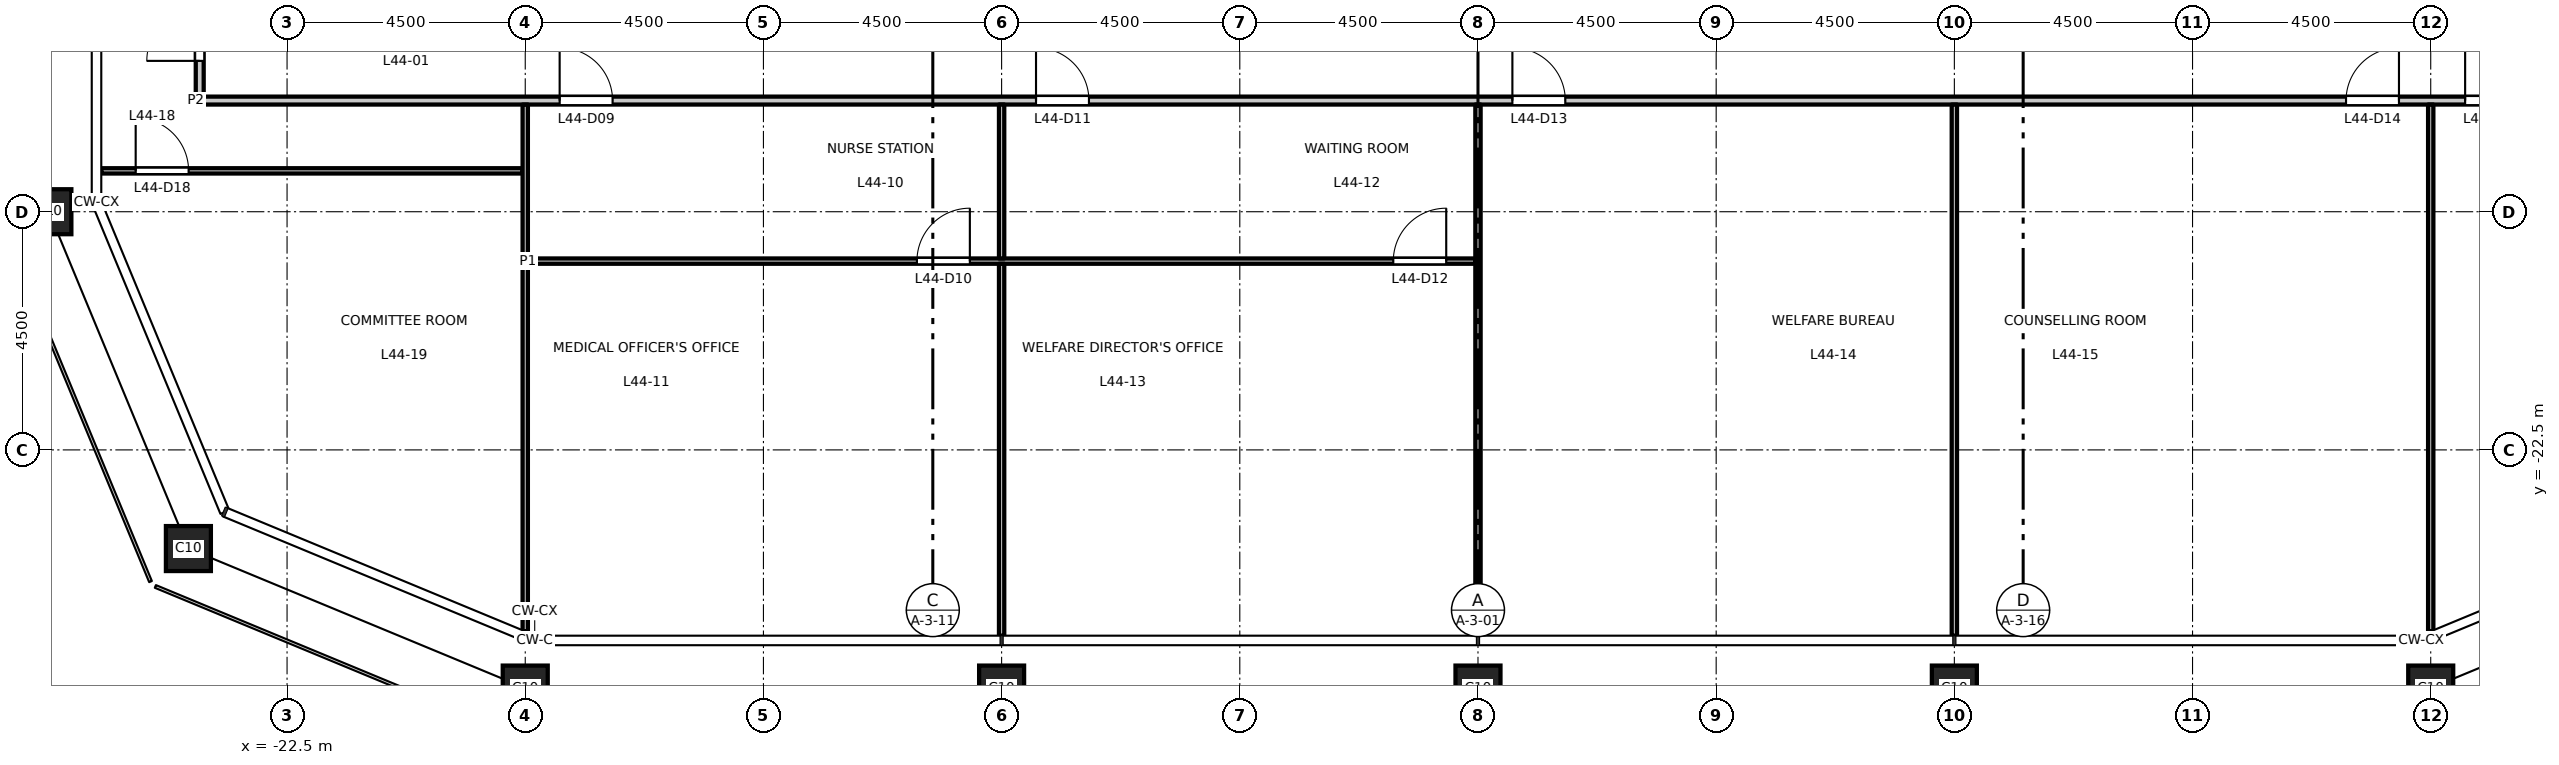
"""IFC4 building model, lengths in metres.
Left out: names, types, materials, properties, quantities, classifications, styles, units other than length and angle.
Written with IfcOpenShell. Run it as: python <this file> out.ifc"""

import sys

from ifc_helpers import new_model, si_unit, direction, frame, frame_2d, origin, origin_2d, place, context, subcontext, project, spatial, rectangle, hollow_rectangle, extrude, element, fill, save


model = new_model("IFC4")
c1 = context("Model", 3, precision=1e-05, world=origin(), true_north=direction((0.0, 1.0)))
c2 = subcontext(c1, "Body", "Model", "MODEL_VIEW")
j1 = project(units=[si_unit("LENGTHUNIT", "METRE"), si_unit("PLANEANGLEUNIT", "RADIAN")], contexts=[c1])
p1 = place(None, origin())
s1 = spatial("IfcSite", under=j1, at=p1, CompositionType="ELEMENT")
p2 = place(p1, origin())
s2 = spatial("IfcBuilding", under=s1, at=p2, CompositionType="ELEMENT")
p3 = place(p2, frame((0.0, 0.0, 206.2)))
s3 = spatial("IfcBuildingStorey", under=s2, at=p3, CompositionType="ELEMENT", Elevation=206.2)
for number, where, z_axis, x_axis in (
    (1, (-18.0, -27.0, 0.0), (0.0, 0.0, 1.0), (1.0, 0.0, 0.0)),
    (2, (-9.0, -27.0, 0.0), (0.0, 0.0, 1.0), (1.0, 0.0, 0.0)),
    (3, (0.0, -27.0, 0.0), (0.0, 0.0, 1.0), (1.0, 0.0, 0.0)),
    (4, (9.0, -27.0, 0.0), (0.0, 0.0, 1.0), (1.0, 0.0, 0.0)),
    (5, (18.0, -27.0, 0.0), (0.0, 0.0, 1.0), (1.0, 0.0, 0.0)),
    (6, (-27.0, -18.0, 0.0), (0.0, 0.0, 1.0), (1.0, 0.0, 0.0)),
    (7, (-24.364, -24.364, 0.0), (0.0, 0.0, 1.0), (1.0, 0.0, 0.0)),
):
    element("IfcColumn", number, at=place(p3, frame(where, z_axis=z_axis, x_axis=x_axis)), inside=s3, PredefinedType="COLUMN", context=c2, shape_type="SweptSolid", body=[
        extrude(hollow_rectangle(XDim=0.85, YDim=0.85, WallThickness=0.05, at=origin_2d()), origin(), (0.0, 0.0, 1.0), 4.5),
    ])
p4 = place(p3, frame((-17.95, -18.933, 0.0), z_axis=(0.0, 0.0, 1.0), x_axis=(1.0, 0.0, 0.0)))
e8 = element("IfcWall", 8, at=p4, inside=s3, PredefinedType="PARTITIONING", context=c2, shape_type="SweptSolid", body=[
    extrude(rectangle(XDim=17.9, YDim=0.1, at=frame_2d((8.95, 0.0))), origin(), (0.0, 0.0, 1.0), 4.35),
])
p5 = place(p4, frame((7.35, 0.0, 0.0)))
e9 = element("IfcOpeningElement", 9, at=p5, cuts=e8, PredefinedType="OPENING", context=c2, shape_type="SweptSolid", body=[
    extrude(rectangle(XDim=1.0, YDim=2.1, at=frame_2d((0.5, 1.05))), frame((0.0, 0.06, 0.0), z_axis=(0.0, -1.0, 0.0), x_axis=(1.0, 0.0, 0.0)), (0.0, 0.0, 1.0), 0.12),
])
p6 = place(p4, frame((16.35, 0.0, 0.0)))
e10 = element("IfcOpeningElement", 10, at=p6, cuts=e8, PredefinedType="OPENING", context=c2, shape_type="SweptSolid", body=[
    extrude(rectangle(XDim=1.0, YDim=2.1, at=frame_2d((0.5, 1.05))), frame((0.0, 0.06, 0.0), z_axis=(0.0, -1.0, 0.0), x_axis=(1.0, 0.0, 0.0)), (0.0, 0.0, 1.0), 0.12),
])
p7 = place(p3, frame((-26.01, -17.228, 0.0), z_axis=(0.0, 0.0, 1.0), x_axis=(1.0, 0.0, 0.0)))
e11 = element("IfcWall", 11, at=p7, inside=s3, PredefinedType="PARTITIONING", context=c2, shape_type="SweptSolid", body=[
    extrude(rectangle(XDim=7.96, YDim=0.1, at=frame_2d((3.98, 0.0))), origin(), (0.0, 0.0, 1.0), 4.35),
])
p8 = place(p7, frame((0.65, 0.0, 0.0)))
e12 = element("IfcOpeningElement", 12, at=p8, cuts=e11, PredefinedType="OPENING", context=c2, shape_type="SweptSolid", body=[
    extrude(rectangle(XDim=1.0, YDim=2.1, at=frame_2d((0.5, 1.05))), frame((0.0, 0.06, 0.0), z_axis=(0.0, -1.0, 0.0), x_axis=(1.0, 0.0, 0.0)), (0.0, 0.0, 1.0), 0.12),
])
p9 = place(p3, frame((-24.225, -15.9, 0.0), z_axis=(0.0, 0.0, 1.0), x_axis=(1.0, 0.0, 0.0)))
e13 = element("IfcWall", 13, at=p9, inside=s3, PredefinedType="PARTITIONING", context=c2, shape_type="SweptSolid", body=[
    extrude(rectangle(XDim=48.45, YDim=0.15, at=frame_2d((24.225, 0.0))), origin(), (0.0, 0.0, 1.0), 4.35),
])
p10 = place(p9, frame((6.875, 0.0, 0.0)))
e14 = element("IfcOpeningElement", 14, at=p10, cuts=e13, PredefinedType="OPENING", context=c2, shape_type="SweptSolid", body=[
    extrude(rectangle(XDim=1.0, YDim=2.1, at=frame_2d((0.5, 1.05))), frame((0.0, 0.085, 0.0), z_axis=(0.0, -1.0, 0.0), x_axis=(1.0, 0.0, 0.0)), (0.0, 0.0, 1.0), 0.17),
])
p11 = place(p9, frame((15.875, 0.0, 0.0)))
e15 = element("IfcOpeningElement", 15, at=p11, cuts=e13, PredefinedType="OPENING", context=c2, shape_type="SweptSolid", body=[
    extrude(rectangle(XDim=1.0, YDim=2.1, at=frame_2d((0.5, 1.05))), frame((0.0, 0.085, 0.0), z_axis=(0.0, -1.0, 0.0), x_axis=(1.0, 0.0, 0.0)), (0.0, 0.0, 1.0), 0.17),
])
p12 = place(p9, frame((24.875, 0.0, 0.0)))
e16 = element("IfcOpeningElement", 16, at=p12, cuts=e13, PredefinedType="OPENING", context=c2, shape_type="SweptSolid", body=[
    extrude(rectangle(XDim=1.0, YDim=2.1, at=frame_2d((0.5, 1.05))), frame((0.0, 0.085, 0.0), z_axis=(0.0, -1.0, 0.0), x_axis=(1.0, 0.0, 0.0)), (0.0, 0.0, 1.0), 0.17),
])
p13 = place(p9, frame((40.625, 0.0, 0.0)))
e17 = element("IfcOpeningElement", 17, at=p13, cuts=e13, PredefinedType="OPENING", context=c2, shape_type="SweptSolid", body=[
    extrude(rectangle(XDim=1.0, YDim=2.1, at=frame_2d((0.5, 1.05))), frame((0.0, 0.085, 0.0), z_axis=(0.0, -1.0, 0.0), x_axis=(1.0, 0.0, 0.0)), (0.0, 0.0, 1.0), 0.17),
])
p14 = place(p9, frame((42.875, 0.0, 0.0)))
e18 = element("IfcOpeningElement", 18, at=p14, cuts=e13, PredefinedType="OPENING", context=c2, shape_type="SweptSolid", body=[
    extrude(rectangle(XDim=1.0, YDim=2.1, at=frame_2d((0.5, 1.05))), frame((0.0, 0.085, 0.0), z_axis=(0.0, -1.0, 0.0), x_axis=(1.0, 0.0, 0.0)), (0.0, 0.0, 1.0), 0.17),
])
p15 = place(p3, frame((-24.15, -15.825, 0.0), z_axis=(0.0, 0.0, 1.0), x_axis=(0.0, 1.0, 0.0)))
e19 = element("IfcWall", 19, at=p15, inside=s3, PredefinedType="PARTITIONING", context=c2, shape_type="SweptSolid", body=[
    extrude(rectangle(XDim=31.65, YDim=0.15, at=frame_2d((15.825, 0.0))), origin(), (0.0, 0.0, 1.0), 4.35),
])
p16 = place(p15, frame((0.675, 0.0, 0.0)))
e20 = element("IfcOpeningElement", 20, at=p16, cuts=e19, PredefinedType="OPENING", context=c2, shape_type="SweptSolid", body=[
    extrude(rectangle(XDim=1.0, YDim=2.1, at=frame_2d((0.5, 1.05))), frame((0.0, 0.085, 0.0), z_axis=(0.0, -1.0, 0.0), x_axis=(1.0, 0.0, 0.0)), (0.0, 0.0, 1.0), 0.17),
])
p17 = place(p15, frame((2.925, 0.0, 0.0)))
e21 = element("IfcOpeningElement", 21, at=p17, cuts=e19, PredefinedType="OPENING", context=c2, shape_type="SweptSolid", body=[
    extrude(rectangle(XDim=1.0, YDim=2.1, at=frame_2d((0.5, 1.05))), frame((0.0, 0.085, 0.0), z_axis=(0.0, -1.0, 0.0), x_axis=(1.0, 0.0, 0.0)), (0.0, 0.0, 1.0), 0.17),
])
p18 = place(p15, frame((14.175, 0.0, 0.0)))
e22 = element("IfcOpeningElement", 22, at=p18, cuts=e19, PredefinedType="OPENING", context=c2, shape_type="SweptSolid", body=[
    extrude(rectangle(XDim=1.0, YDim=2.1, at=frame_2d((0.5, 1.05))), frame((0.0, 0.085, 0.0), z_axis=(0.0, -1.0, 0.0), x_axis=(1.0, 0.0, 0.0)), (0.0, 0.0, 1.0), 0.17),
])
p19 = place(p15, frame((16.425, 0.0, 0.0)))
e23 = element("IfcOpeningElement", 23, at=p19, cuts=e19, PredefinedType="OPENING", context=c2, shape_type="SweptSolid", body=[
    extrude(rectangle(XDim=1.0, YDim=2.1, at=frame_2d((0.5, 1.05))), frame((0.0, 0.085, 0.0), z_axis=(0.0, -1.0, 0.0), x_axis=(1.0, 0.0, 0.0)), (0.0, 0.0, 1.0), 0.17),
])
p20 = place(p15, frame((27.675, 0.0, 0.0)))
e24 = element("IfcOpeningElement", 24, at=p20, cuts=e19, PredefinedType="OPENING", context=c2, shape_type="SweptSolid", body=[
    extrude(rectangle(XDim=1.0, YDim=2.1, at=frame_2d((0.5, 1.05))), frame((0.0, 0.085, 0.0), z_axis=(0.0, -1.0, 0.0), x_axis=(1.0, 0.0, 0.0)), (0.0, 0.0, 1.0), 0.17),
])
p21 = place(p3, frame((-18.0, -25.928, 0.0), z_axis=(0.0, 0.0, 1.0), x_axis=(0.0, 1.0, 0.0)))
e25 = element("IfcWall", 25, at=p21, inside=s3, PredefinedType="PARTITIONING", context=c2, shape_type="SweptSolid", body=[
    extrude(rectangle(XDim=9.953, YDim=0.1, at=frame_2d((4.977, 0.0))), origin(), (0.0, 0.0, 1.0), 3.65),
])
p22 = place(p3, frame((-9.0, -26.01, 0.0), z_axis=(0.0, 0.0, 1.0), x_axis=(0.0, 1.0, 0.0)))
e26 = element("IfcWall", 26, at=p22, inside=s3, PredefinedType="PARTITIONING", context=c2, shape_type="SweptSolid", body=[
    extrude(rectangle(XDim=7.027, YDim=0.1, at=frame_2d((3.514, 0.0))), origin(), (0.0, 0.0, 1.0), 3.65),
])
p23 = place(p3, frame((-9.0, -18.883, 0.0), z_axis=(0.0, 0.0, 1.0), x_axis=(0.0, 1.0, 0.0)))
e27 = element("IfcWall", 27, at=p23, inside=s3, PredefinedType="PARTITIONING", context=c2, shape_type="SweptSolid", body=[
    extrude(rectangle(XDim=2.908, YDim=0.1, at=frame_2d((1.454, 0.0))), origin(), (0.0, 0.0, 1.0), 3.65),
])
p24 = place(p3, frame((0.0, -26.01, 0.0), z_axis=(0.0, 0.0, 1.0), x_axis=(0.0, 1.0, 0.0)))
e28 = element("IfcWall", 28, at=p24, inside=s3, PredefinedType="PARTITIONING", context=c2, shape_type="SweptSolid", body=[
    extrude(rectangle(XDim=10.035, YDim=0.1, at=frame_2d((5.018, 0.0))), origin(), (0.0, 0.0, 1.0), 3.55),
])
p25 = place(p3, frame((9.0, -26.01, 0.0), z_axis=(0.0, 0.0, 1.0), x_axis=(0.0, 1.0, 0.0)))
e29 = element("IfcWall", 29, at=p25, inside=s3, PredefinedType="PARTITIONING", context=c2, shape_type="SweptSolid", body=[
    extrude(rectangle(XDim=10.035, YDim=0.1, at=frame_2d((5.018, 0.0))), origin(), (0.0, 0.0, 1.0), 3.65),
])
p26 = place(p3, frame((18.0, -25.928, 0.0), z_axis=(0.0, 0.0, 1.0), x_axis=(0.0, 1.0, 0.0)))
e30 = element("IfcWall", 30, at=p26, inside=s3, PredefinedType="PARTITIONING", context=c2, shape_type="SweptSolid", body=[
    extrude(rectangle(XDim=9.953, YDim=0.1, at=frame_2d((4.977, 0.0))), origin(), (0.0, 0.0, 1.0), 3.65),
])
p27 = place(p10, origin())
e31 = element("IfcDoor", 31, at=p27, inside=s3, OperationType="SINGLE_SWING_LEFT", PredefinedType="DOOR", context=c2, shape_type="SweptSolid", body=[
    extrude(rectangle(XDim=1.0, YDim=2.1, at=frame_2d((0.5, 1.05))), frame((0.0, 0.025, 0.0), z_axis=(0.0, -1.0, 0.0), x_axis=(1.0, 0.0, 0.0)), (0.0, 0.0, 1.0), 0.05),
])
fill(e14, e31)
p28 = place(p5, origin())
e32 = element("IfcDoor", 32, at=p28, inside=s3, OperationType="SINGLE_SWING_RIGHT", PredefinedType="DOOR", context=c2, shape_type="SweptSolid", body=[
    extrude(rectangle(XDim=1.0, YDim=2.1, at=frame_2d((0.5, 1.05))), frame((0.0, 0.025, 0.0), z_axis=(0.0, -1.0, 0.0), x_axis=(1.0, 0.0, 0.0)), (0.0, 0.0, 1.0), 0.05),
])
fill(e9, e32)
p29 = place(p11, origin())
e33 = element("IfcDoor", 33, at=p29, inside=s3, OperationType="SINGLE_SWING_LEFT", PredefinedType="DOOR", context=c2, shape_type="SweptSolid", body=[
    extrude(rectangle(XDim=1.0, YDim=2.1, at=frame_2d((0.5, 1.05))), frame((0.0, 0.025, 0.0), z_axis=(0.0, -1.0, 0.0), x_axis=(1.0, 0.0, 0.0)), (0.0, 0.0, 1.0), 0.05),
])
fill(e15, e33)
p30 = place(p6, origin())
e34 = element("IfcDoor", 34, at=p30, inside=s3, OperationType="SINGLE_SWING_RIGHT", PredefinedType="DOOR", context=c2, shape_type="SweptSolid", body=[
    extrude(rectangle(XDim=1.0, YDim=2.1, at=frame_2d((0.5, 1.05))), frame((0.0, 0.025, 0.0), z_axis=(0.0, -1.0, 0.0), x_axis=(1.0, 0.0, 0.0)), (0.0, 0.0, 1.0), 0.05),
])
fill(e10, e34)
p31 = place(p12, origin())
e35 = element("IfcDoor", 35, at=p31, inside=s3, OperationType="SINGLE_SWING_LEFT", PredefinedType="DOOR", context=c2, shape_type="SweptSolid", body=[
    extrude(rectangle(XDim=1.0, YDim=2.1, at=frame_2d((0.5, 1.05))), frame((0.0, 0.025, 0.0), z_axis=(0.0, -1.0, 0.0), x_axis=(1.0, 0.0, 0.0)), (0.0, 0.0, 1.0), 0.05),
])
fill(e16, e35)
p32 = place(p13, origin())
e36 = element("IfcDoor", 36, at=p32, inside=s3, OperationType="SINGLE_SWING_RIGHT", PredefinedType="DOOR", context=c2, shape_type="SweptSolid", body=[
    extrude(rectangle(XDim=1.0, YDim=2.1, at=frame_2d((0.5, 1.05))), frame((0.0, 0.025, 0.0), z_axis=(0.0, -1.0, 0.0), x_axis=(1.0, 0.0, 0.0)), (0.0, 0.0, 1.0), 0.05),
])
fill(e17, e36)
p33 = place(p16, origin())
e37 = element("IfcDoor", 37, at=p33, inside=s3, OperationType="SINGLE_SWING_LEFT", PredefinedType="DOOR", context=c2, shape_type="SweptSolid", body=[
    extrude(rectangle(XDim=1.0, YDim=2.1, at=frame_2d((0.5, 1.05))), frame((0.0, 0.025, 0.0), z_axis=(0.0, -1.0, 0.0), x_axis=(1.0, 0.0, 0.0)), (0.0, 0.0, 1.0), 0.05),
])
fill(e20, e37)
p34 = place(p8, origin())
e38 = element("IfcDoor", 38, at=p34, inside=s3, OperationType="SINGLE_SWING_LEFT", PredefinedType="DOOR", context=c2, shape_type="SweptSolid", body=[
    extrude(rectangle(XDim=1.0, YDim=2.1, at=frame_2d((0.5, 1.05))), frame((0.0, 0.025, 0.0), z_axis=(0.0, -1.0, 0.0), x_axis=(1.0, 0.0, 0.0)), (0.0, 0.0, 1.0), 0.05),
])
fill(e12, e38)
p35 = place(p14, origin())
e39 = element("IfcDoor", 39, at=p35, inside=s3, OperationType="SINGLE_SWING_LEFT", PredefinedType="DOOR", context=c2, shape_type="SweptSolid", body=[
    extrude(rectangle(XDim=1.0, YDim=2.1, at=frame_2d((0.5, 1.05))), frame((0.0, 0.025, 0.0), z_axis=(0.0, -1.0, 0.0), x_axis=(1.0, 0.0, 0.0)), (0.0, 0.0, 1.0), 0.05),
])
fill(e18, e39)
save(model, sys.argv[1])
